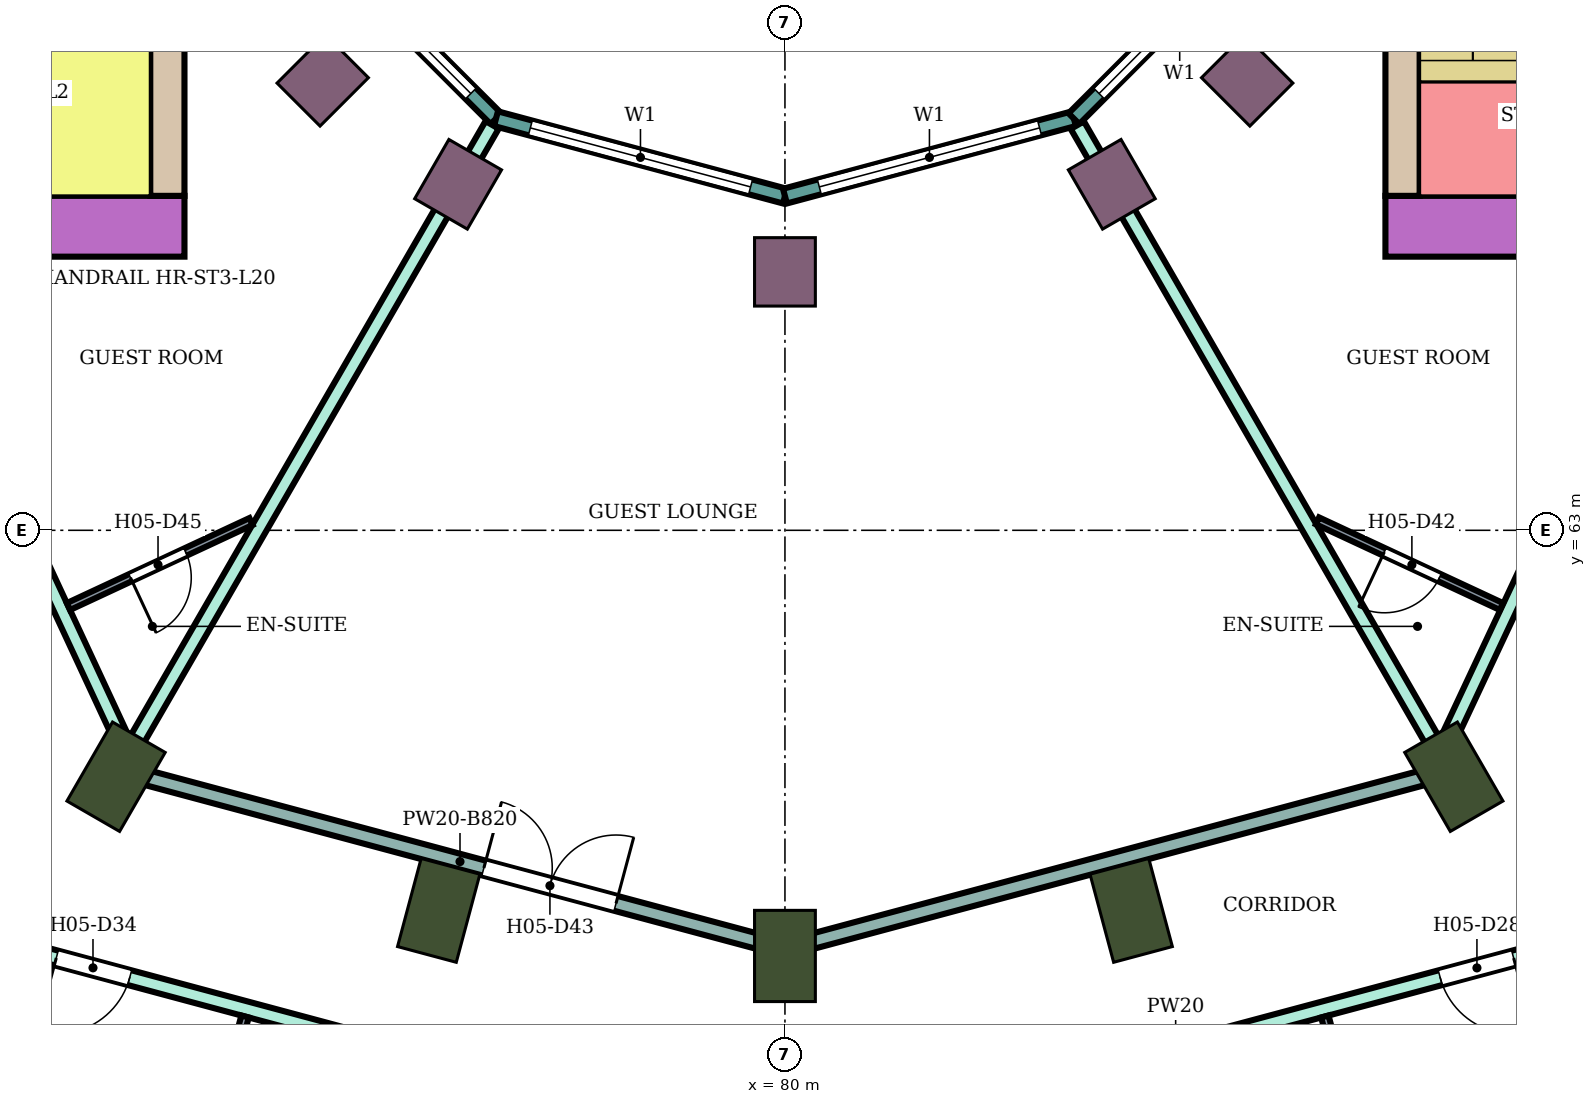
"""IFC4 building model, lengths in metres.
Left out: names, types, materials, properties, quantities, classifications, styles, units other than length and angle.
Written with IfcOpenShell. Run it as: python <this file> out.ifc"""

import sys

from ifc_helpers import new_model, si_unit, direction, frame, frame_2d, origin, origin_2d, place, context, subcontext, project, spatial, rectangle, extrude, element, fill, save


model = new_model("IFC4")
c1 = context("Model", 3, precision=1e-05, world=origin(), true_north=direction((0.0, 1.0)))
c2 = subcontext(c1, "Body", "Model", "MODEL_VIEW")
j1 = project(units=[si_unit("LENGTHUNIT", "METRE"), si_unit("PLANEANGLEUNIT", "RADIAN")], contexts=[c1])
p1 = place(None, origin())
s1 = spatial("IfcSite", under=j1, at=p1, CompositionType="ELEMENT")
p2 = place(p1, origin())
s2 = spatial("IfcBuilding", under=s1, at=p2, CompositionType="ELEMENT")
p3 = place(p2, frame((0.0, 0.0, 90.0)))
s3 = spatial("IfcBuildingStorey", under=s2, at=p3, CompositionType="ELEMENT", Elevation=90.0)
for number, where, z_axis, x_axis in (
    (1, (71.2, 59.758, 0.0), (0.0, 0.0, 1.0), (-0.5, -0.866, 0.0)),
    (2, (75.445, 58.0, 0.0), (0.0, 0.0, 1.0), (-0.259, -0.966, 0.0)),
    (3, (80.0, 57.4, 0.0), (0.0, 0.0, 1.0), (0.0, -1.0, 0.0)),
    (4, (84.555, 58.0, 0.0), (0.0, 0.0, 1.0), (0.259, -0.966, 0.0)),
    (5, (88.8, 59.758, 0.0), (0.0, 0.0, 1.0), (0.5, -0.866, 0.0)),
):
    element("IfcColumn", number, at=place(p3, frame(where, z_axis=z_axis, x_axis=x_axis)), inside=s3, PredefinedType="COLUMN", context=c2, shape_type="SweptSolid", body=[
        extrude(rectangle(XDim=1.2, YDim=0.8, at=origin_2d()), origin(), (0.0, 0.0, 1.0), 3.8),
    ])
for number, where, z_axis, x_axis in (
    (6, (73.919, 68.919, 0.0), (0.0, 0.0, 1.0), (-0.707, -0.707, 0.0)),
    (7, (75.7, 67.552, 0.0), (0.0, 0.0, 1.0), (-0.5, -0.866, 0.0)),
    (8, (80.0, 66.4, 0.0), (0.0, 0.0, 1.0), (0.0, -1.0, 0.0)),
    (9, (84.3, 67.552, 0.0), (0.0, 0.0, 1.0), (0.5, -0.866, 0.0)),
    (10, (86.081, 68.919, 0.0), (0.0, 0.0, 1.0), (0.707, -0.707, 0.0)),
):
    element("IfcColumn", number, at=place(p3, frame(where, z_axis=z_axis, x_axis=x_axis)), inside=s3, PredefinedType="COLUMN", context=c2, shape_type="SweptSolid", body=[
        extrude(rectangle(XDim=0.9, YDim=0.8, at=origin_2d()), origin(), (0.0, 0.0, 1.0), 3.8),
    ])
p4 = place(p3, frame((87.9, 67.0, 0.0), z_axis=(0.0, 0.0, 1.0), x_axis=(1.0, 0.0, 0.0)))
e11 = element("IfcWall", 11, at=p4, inside=s3, PredefinedType="SHEAR", context=c2, shape_type="SweptSolid", body=[
    extrude(rectangle(XDim=14.7, YDim=0.8, at=frame_2d((7.35, 0.0))), origin(), (0.0, 0.0, 1.0), 3.48),
])
p5 = place(p4, frame((4.2, 0.0, 0.0)))
e12 = element("IfcOpeningElement", 12, at=p5, cuts=e11, PredefinedType="OPENING", context=c2, shape_type="SweptSolid", body=[
    extrude(rectangle(XDim=2.4, YDim=2.4, at=frame_2d((1.2, 1.2))), frame((0.0, 0.41, 0.0), z_axis=(0.0, -1.0, 0.0), x_axis=(1.0, 0.0, 0.0)), (0.0, 0.0, 1.0), 0.82),
])
p6 = place(p3, frame((88.125, 67.4, 0.0), z_axis=(0.0, 0.0, 1.0), x_axis=(0.0, 1.0, 0.0)))
e13 = element("IfcWall", 13, at=p6, inside=s3, PredefinedType="SHEAR", context=c2, shape_type="SweptSolid", body=[
    extrude(rectangle(XDim=7.6, YDim=0.45, at=frame_2d((3.8, 0.0))), origin(), (0.0, 0.0, 1.0), 3.48),
])
p7 = place(p3, frame((72.1, 67.0, 0.0), z_axis=(0.0, 0.0, 1.0), x_axis=(-1.0, 0.0, 0.0)))
e14 = element("IfcWall", 14, at=p7, inside=s3, PredefinedType="SHEAR", context=c2, shape_type="SweptSolid", body=[
    extrude(rectangle(XDim=14.7, YDim=0.8, at=frame_2d((7.35, 0.0))), origin(), (0.0, 0.0, 1.0), 3.48),
])
p8 = place(p7, frame((4.2, 0.0, 0.0)))
e15 = element("IfcOpeningElement", 15, at=p8, cuts=e14, PredefinedType="OPENING", context=c2, shape_type="SweptSolid", body=[
    extrude(rectangle(XDim=2.4, YDim=2.4, at=frame_2d((1.2, 1.2))), frame((0.0, 0.41, 0.0), z_axis=(0.0, -1.0, 0.0), x_axis=(1.0, 0.0, 0.0)), (0.0, 0.0, 1.0), 0.82),
])
p9 = place(p3, frame((71.875, 75.0, 0.0), z_axis=(0.0, 0.0, 1.0), x_axis=(0.0, -1.0, 0.0)))
e16 = element("IfcWall", 16, at=p9, inside=s3, PredefinedType="SHEAR", context=c2, shape_type="SweptSolid", body=[
    extrude(rectangle(XDim=7.6, YDim=0.45, at=frame_2d((3.8, 0.0))), origin(), (0.0, 0.0, 1.0), 3.48),
])
p10 = place(p3, frame((73.415, 71.198, 0.0), z_axis=(0.0, 0.0, 1.0), x_axis=(0.707106781187, -0.707106781187, 0.0)))
e17 = element("IfcWall", 17, at=p10, inside=s3, PredefinedType="NOTDEFINED", context=c2, shape_type="SweptSolid", body=[
    extrude(rectangle(XDim=3.936, YDim=0.2, at=frame_2d((1.968, 0.0))), origin(), (0.0, 0.0, 1.0), 3.8),
])
p11 = place(p10, frame((0.468, 0.0, 0.9)))
e18 = element("IfcOpeningElement", 18, at=p11, cuts=e17, PredefinedType="OPENING", context=c2, shape_type="SweptSolid", body=[
    extrude(rectangle(XDim=3.0, YDim=2.3, at=frame_2d((1.5, 1.15))), frame((0.0, 0.11, 0.0), z_axis=(0.0, -1.0, 0.0), x_axis=(1.0, 0.0, 0.0)), (0.0, 0.0, 1.0), 0.22),
])
p12 = place(p3, frame((76.198, 68.415, 0.0), z_axis=(0.0, 0.0, 1.0), x_axis=(0.965933654434, -0.258789828301, 0.0)))
e19 = element("IfcWall", 19, at=p12, inside=s3, PredefinedType="NOTDEFINED", context=c2, shape_type="SweptSolid", body=[
    extrude(rectangle(XDim=3.936, YDim=0.2, at=frame_2d((1.968, 0.0))), origin(), (0.0, 0.0, 1.0), 3.8),
])
p13 = place(p12, frame((0.468, 0.0, 0.9)))
e20 = element("IfcOpeningElement", 20, at=p13, cuts=e19, PredefinedType="OPENING", context=c2, shape_type="SweptSolid", body=[
    extrude(rectangle(XDim=3.0, YDim=2.3, at=frame_2d((1.5, 1.15))), frame((0.0, 0.11, 0.0), z_axis=(0.0, -1.0, 0.0), x_axis=(1.0, 0.0, 0.0)), (0.0, 0.0, 1.0), 0.22),
])
p14 = place(p3, frame((80.0, 67.396, 0.0), z_axis=(0.0, 0.0, 1.0), x_axis=(0.965933654434, 0.258789828301, 0.0)))
e21 = element("IfcWall", 21, at=p14, inside=s3, PredefinedType="NOTDEFINED", context=c2, shape_type="SweptSolid", body=[
    extrude(rectangle(XDim=3.936, YDim=0.2, at=frame_2d((1.968, 0.0))), origin(), (0.0, 0.0, 1.0), 3.8),
])
p15 = place(p14, frame((0.468, 0.0, 0.9)))
e22 = element("IfcOpeningElement", 22, at=p15, cuts=e21, PredefinedType="OPENING", context=c2, shape_type="SweptSolid", body=[
    extrude(rectangle(XDim=3.0, YDim=2.3, at=frame_2d((1.5, 1.15))), frame((0.0, 0.11, 0.0), z_axis=(0.0, -1.0, 0.0), x_axis=(1.0, 0.0, 0.0)), (0.0, 0.0, 1.0), 0.22),
])
p16 = place(p3, frame((83.802, 68.415, 0.0), z_axis=(0.0, 0.0, 1.0), x_axis=(0.707106781187, 0.707106781187, 0.0)))
e23 = element("IfcWall", 23, at=p16, inside=s3, PredefinedType="NOTDEFINED", context=c2, shape_type="SweptSolid", body=[
    extrude(rectangle(XDim=3.936, YDim=0.2, at=frame_2d((1.968, 0.0))), origin(), (0.0, 0.0, 1.0), 3.8),
])
p17 = place(p16, frame((0.468, 0.0, 0.9)))
e24 = element("IfcOpeningElement", 24, at=p17, cuts=e23, PredefinedType="OPENING", context=c2, shape_type="SweptSolid", body=[
    extrude(rectangle(XDim=3.0, YDim=2.3, at=frame_2d((1.5, 1.15))), frame((0.0, 0.11, 0.0), z_axis=(0.0, -1.0, 0.0), x_axis=(1.0, 0.0, 0.0)), (0.0, 0.0, 1.0), 0.22),
])
p18 = place(p3, frame((68.321, 66.6, 0.0), z_axis=(0.0, 0.0, 1.0), x_axis=(0.421914092414, -0.906635813666, 0.0)))
e25 = element("IfcWall", 25, at=p18, inside=s3, PredefinedType="PARTITIONING", context=c2, shape_type="SweptSolid", body=[
    extrude(rectangle(XDim=7.459, YDim=0.2, at=frame_2d((3.73, 0.0))), origin(), (0.0, 0.0, 1.0), 3.35),
])
p19 = place(p18, frame((0.7, 0.0, 0.0)))
e26 = element("IfcOpeningElement", 26, at=p19, cuts=e25, PredefinedType="OPENING", context=c2, shape_type="SweptSolid", body=[
    extrude(rectangle(XDim=1.0, YDim=2.1, at=frame_2d((0.5, 1.05))), frame((0.0, 0.11, 0.0), z_axis=(0.0, -1.0, 0.0), x_axis=(1.0, 0.0, 0.0)), (0.0, 0.0, 1.0), 0.22),
])
p20 = place(p3, frame((69.652, 57.578, 0.0), z_axis=(0.0, 0.0, 1.0), x_axis=(0.965857425723, -0.259074184695, 0.0)))
e27 = element("IfcWall", 27, at=p20, inside=s3, PredefinedType="PARTITIONING", context=c2, shape_type="SweptSolid", body=[
    extrude(rectangle(XDim=10.623, YDim=0.2, at=frame_2d((5.312, 0.0))), origin(), (0.0, 0.0, 1.0), 3.35),
])
p21 = place(p20, frame((9.163, 0.0, 0.0)))
e28 = element("IfcOpeningElement", 28, at=p21, cuts=e27, PredefinedType="OPENING", context=c2, shape_type="SweptSolid", body=[
    extrude(rectangle(XDim=1.0, YDim=2.1, at=frame_2d((0.5, 1.05))), frame((0.0, 0.11, 0.0), z_axis=(0.0, -1.0, 0.0), x_axis=(1.0, 0.0, 0.0)), (0.0, 0.0, 1.0), 0.22),
])
p22 = place(p20, frame((0.788, 0.0, 0.0)))
e29 = element("IfcOpeningElement", 29, at=p22, cuts=e27, PredefinedType="OPENING", context=c2, shape_type="SweptSolid", body=[
    extrude(rectangle(XDim=1.0, YDim=2.1, at=frame_2d((0.5, 1.05))), frame((0.0, 0.11, 0.0), z_axis=(0.0, -1.0, 0.0), x_axis=(1.0, 0.0, 0.0)), (0.0, 0.0, 1.0), 0.22),
])
p23 = place(p3, frame((71.459, 60.218, 0.0), z_axis=(0.0, 0.0, 1.0), x_axis=(0.500232027118, 0.865891401416, 0.0)))
e30 = element("IfcWall", 30, at=p23, inside=s3, PredefinedType="PARTITIONING", context=c2, shape_type="SweptSolid", body=[
    extrude(rectangle(XDim=9.372, YDim=0.2, at=frame_2d((4.686, 0.0))), origin(), (0.0, 0.0, 1.0), 3.35),
])
p24 = place(p3, frame((71.498, 59.774, 0.0), z_axis=(0.0, 0.0, 1.0), x_axis=(0.965911938046, -0.258870871168, 0.0)))
e31 = element("IfcWall", 31, at=p24, inside=s3, PredefinedType="PARTITIONING", context=c2, shape_type="SweptSolid", body=[
    extrude(rectangle(XDim=8.752, YDim=0.2, at=frame_2d((4.376, 0.0))), origin(), (0.0, 0.0, 1.0), 2.98),
])
p25 = place(p24, frame((4.701, 0.0, 0.0)))
e32 = element("IfcOpeningElement", 32, at=p25, cuts=e31, PredefinedType="OPENING", context=c2, shape_type="SweptSolid", body=[
    extrude(rectangle(XDim=1.8, YDim=2.1, at=frame_2d((0.9, 1.05))), frame((0.0, 0.11, 0.0), z_axis=(0.0, -1.0, 0.0), x_axis=(1.0, 0.0, 0.0)), (0.0, 0.0, 1.0), 0.22),
])
p26 = place(p3, frame((80.0, 54.805, 0.0), z_axis=(0.0, 0.0, 1.0), x_axis=(0.965962177934, 0.258683340788, 0.0)))
e33 = element("IfcWall", 33, at=p26, inside=s3, PredefinedType="PARTITIONING", context=c2, shape_type="SweptSolid", body=[
    extrude(rectangle(XDim=10.643, YDim=0.2, at=frame_2d((5.322, 0.0))), origin(), (0.0, 0.0, 1.0), 3.35),
])
p27 = place(p26, frame((8.925, 0.0, 0.0)))
e34 = element("IfcOpeningElement", 34, at=p27, cuts=e33, PredefinedType="OPENING", context=c2, shape_type="SweptSolid", body=[
    extrude(rectangle(XDim=1.0, YDim=2.1, at=frame_2d((0.5, 1.05))), frame((0.0, 0.11, 0.0), z_axis=(0.0, -1.0, 0.0), x_axis=(1.0, 0.0, 0.0)), (0.0, 0.0, 1.0), 0.22),
])
p28 = place(p26, frame((0.55, 0.0, 0.0)))
e35 = element("IfcOpeningElement", 35, at=p28, cuts=e33, PredefinedType="OPENING", context=c2, shape_type="SweptSolid", body=[
    extrude(rectangle(XDim=1.0, YDim=2.1, at=frame_2d((0.5, 1.05))), frame((0.0, 0.11, 0.0), z_axis=(0.0, -1.0, 0.0), x_axis=(1.0, 0.0, 0.0)), (0.0, 0.0, 1.0), 0.22),
])
p29 = place(p3, frame((80.0, 57.496, 0.0), z_axis=(0.0, 0.0, 1.0), x_axis=(0.96592471314, 0.258823199396, 0.0)))
e36 = element("IfcWall", 36, at=p29, inside=s3, PredefinedType="PARTITIONING", context=c2, shape_type="SweptSolid", body=[
    extrude(rectangle(XDim=8.732, YDim=0.2, at=frame_2d((4.366, 0.0))), origin(), (0.0, 0.0, 1.0), 2.98),
])
p30 = place(p3, frame((83.846, 68.33, 0.0), z_axis=(0.0, 0.0, 1.0), x_axis=(0.499822319857, -0.866127963163, 0.0)))
e37 = element("IfcWall", 37, at=p30, inside=s3, PredefinedType="PARTITIONING", context=c2, shape_type="SweptSolid", body=[
    extrude(rectangle(XDim=9.382, YDim=0.2, at=frame_2d((4.691, 0.0))), origin(), (0.0, 0.0, 1.0), 3.35),
])
p31 = place(p3, frame((88.501, 59.775, 0.0), z_axis=(0.0, 0.0, 1.0), x_axis=(0.424700525505, 0.905333896215, 0.0)))
e38 = element("IfcWall", 38, at=p31, inside=s3, PredefinedType="PARTITIONING", context=c2, shape_type="SweptSolid", body=[
    extrude(rectangle(XDim=7.53, YDim=0.2, at=frame_2d((3.765, 0.0))), origin(), (0.0, 0.0, 1.0), 3.35),
])
p32 = place(p31, frame((5.83, 0.0, 0.0)))
e39 = element("IfcOpeningElement", 39, at=p32, cuts=e38, PredefinedType="OPENING", context=c2, shape_type="SweptSolid", body=[
    extrude(rectangle(XDim=1.0, YDim=2.1, at=frame_2d((0.5, 1.05))), frame((0.0, 0.11, 0.0), z_axis=(0.0, -1.0, 0.0), x_axis=(1.0, 0.0, 0.0)), (0.0, 0.0, 1.0), 0.22),
])
p33 = place(p3, frame((70.574, 61.997, 0.0), z_axis=(0.0, 0.0, 1.0), x_axis=(0.906503026865, 0.422199315826, 0.0)))
e40 = element("IfcWall", 40, at=p33, inside=s3, PredefinedType="PARTITIONING", context=c2, shape_type="SweptSolid", body=[
    extrude(rectangle(XDim=2.65, YDim=0.1, at=frame_2d((1.325, 0.0))), origin(), (0.0, 0.0, 1.0), 3.35),
])
p34 = place(p33, frame((0.9, 0.0, 0.0)))
e41 = element("IfcOpeningElement", 41, at=p34, cuts=e40, PredefinedType="OPENING", context=c2, shape_type="SweptSolid", body=[
    extrude(rectangle(XDim=0.8, YDim=2.1, at=frame_2d((0.4, 1.05))), frame((0.0, 0.06, 0.0), z_axis=(0.0, -1.0, 0.0), x_axis=(1.0, 0.0, 0.0)), (0.0, 0.0, 1.0), 0.12),
])
p35 = place(p3, frame((72.211, 54.044, 0.0), z_axis=(0.0, 0.0, 1.0), x_axis=(0.258866552082, 0.96591309558, 0.0)))
e42 = element("IfcWall", 42, at=p35, inside=s3, PredefinedType="PARTITIONING", context=c2, shape_type="SweptSolid", body=[
    extrude(rectangle(XDim=2.65, YDim=0.1, at=frame_2d((1.325, 0.0))), origin(), (0.0, 0.0, 1.0), 3.35),
])
p36 = place(p35, frame((0.95, 0.0, 0.0)))
e43 = element("IfcOpeningElement", 43, at=p36, cuts=e42, PredefinedType="OPENING", context=c2, shape_type="SweptSolid", body=[
    extrude(rectangle(XDim=0.8, YDim=2.1, at=frame_2d((0.4, 1.05))), frame((0.0, 0.06, 0.0), z_axis=(0.0, -1.0, 0.0), x_axis=(1.0, 0.0, 0.0)), (0.0, 0.0, 1.0), 0.12),
])
p37 = place(p3, frame((87.006, 63.124, 0.0), z_axis=(0.0, 0.0, 1.0), x_axis=(0.906535604863, -0.422129360642, 0.0)))
e44 = element("IfcWall", 44, at=p37, inside=s3, PredefinedType="PARTITIONING", context=c2, shape_type="SweptSolid", body=[
    extrude(rectangle(XDim=2.67, YDim=0.1, at=frame_2d((1.335, 0.0))), origin(), (0.0, 0.0, 1.0), 3.35),
])
p38 = place(p37, frame((0.97, 0.0, 0.0)))
e45 = element("IfcOpeningElement", 45, at=p38, cuts=e44, PredefinedType="OPENING", context=c2, shape_type="SweptSolid", body=[
    extrude(rectangle(XDim=0.8, YDim=2.1, at=frame_2d((0.4, 1.05))), frame((0.0, 0.06, 0.0), z_axis=(0.0, -1.0, 0.0), x_axis=(1.0, 0.0, 0.0)), (0.0, 0.0, 1.0), 0.12),
])
p39 = place(p3, frame((87.103, 56.604, 0.0), z_axis=(0.0, 0.0, 1.0), x_axis=(0.258883730688, -0.965908491517, 0.0)))
e46 = element("IfcWall", 46, at=p39, inside=s3, PredefinedType="PARTITIONING", context=c2, shape_type="SweptSolid", body=[
    extrude(rectangle(XDim=2.7, YDim=0.1, at=frame_2d((1.35, 0.0))), origin(), (0.0, 0.0, 1.0), 3.35),
])
p40 = place(p39, frame((0.9, 0.0, 0.0)))
e47 = element("IfcOpeningElement", 47, at=p40, cuts=e46, PredefinedType="OPENING", context=c2, shape_type="SweptSolid", body=[
    extrude(rectangle(XDim=0.8, YDim=2.1, at=frame_2d((0.4, 1.05))), frame((0.0, 0.06, 0.0), z_axis=(0.0, -1.0, 0.0), x_axis=(1.0, 0.0, 0.0)), (0.0, 0.0, 1.0), 0.12),
])
p41 = place(p11, origin())
e48 = element("IfcWindow", 48, at=p41, inside=s3, PartitioningType="SINGLE_PANEL", PredefinedType="WINDOW", context=c2, shape_type="SweptSolid", body=[
    extrude(rectangle(XDim=3.0, YDim=2.3, at=frame_2d((1.5, 1.15))), frame((0.0, 0.03, 0.0), z_axis=(0.0, -1.0, 0.0), x_axis=(1.0, 0.0, 0.0)), (0.0, 0.0, 1.0), 0.06),
])
fill(e18, e48)
p42 = place(p13, origin())
e49 = element("IfcWindow", 49, at=p42, inside=s3, PartitioningType="SINGLE_PANEL", PredefinedType="WINDOW", context=c2, shape_type="SweptSolid", body=[
    extrude(rectangle(XDim=3.0, YDim=2.3, at=frame_2d((1.5, 1.15))), frame((0.0, 0.03, 0.0), z_axis=(0.0, -1.0, 0.0), x_axis=(1.0, 0.0, 0.0)), (0.0, 0.0, 1.0), 0.06),
])
fill(e20, e49)
p43 = place(p15, origin())
e50 = element("IfcWindow", 50, at=p43, inside=s3, PartitioningType="SINGLE_PANEL", PredefinedType="WINDOW", context=c2, shape_type="SweptSolid", body=[
    extrude(rectangle(XDim=3.0, YDim=2.3, at=frame_2d((1.5, 1.15))), frame((0.0, 0.03, 0.0), z_axis=(0.0, -1.0, 0.0), x_axis=(1.0, 0.0, 0.0)), (0.0, 0.0, 1.0), 0.06),
])
fill(e22, e50)
p44 = place(p17, origin())
e51 = element("IfcWindow", 51, at=p44, inside=s3, PartitioningType="SINGLE_PANEL", PredefinedType="WINDOW", context=c2, shape_type="SweptSolid", body=[
    extrude(rectangle(XDim=3.0, YDim=2.3, at=frame_2d((1.5, 1.15))), frame((0.0, 0.03, 0.0), z_axis=(0.0, -1.0, 0.0), x_axis=(1.0, 0.0, 0.0)), (0.0, 0.0, 1.0), 0.06),
])
fill(e24, e51)
p45 = place(p27, frame((1.0, 0.0, 0.0), z_axis=(0.0, 0.0, 1.0), x_axis=(-1.0, 0.0, 0.0)))
e52 = element("IfcDoor", 52, at=p45, inside=s3, OperationType="SINGLE_SWING_LEFT", PredefinedType="DOOR", context=c2, shape_type="SweptSolid", body=[
    extrude(rectangle(XDim=1.0, YDim=2.1, at=frame_2d((0.5, 1.05))), frame((0.0, 0.025, 0.0), z_axis=(0.0, -1.0, 0.0), x_axis=(1.0, 0.0, 0.0)), (0.0, 0.0, 1.0), 0.05),
])
fill(e34, e52)
p46 = place(p22, frame((1.0, 0.0, 0.0), z_axis=(0.0, 0.0, 1.0), x_axis=(-1.0, 0.0, 0.0)))
e53 = element("IfcDoor", 53, at=p46, inside=s3, OperationType="SINGLE_SWING_RIGHT", PredefinedType="DOOR", context=c2, shape_type="SweptSolid", body=[
    extrude(rectangle(XDim=1.0, YDim=2.1, at=frame_2d((0.5, 1.05))), frame((0.0, 0.025, 0.0), z_axis=(0.0, -1.0, 0.0), x_axis=(1.0, 0.0, 0.0)), (0.0, 0.0, 1.0), 0.05),
])
fill(e29, e53)
p47 = place(p38, frame((0.8, 0.0, 0.0), z_axis=(0.0, 0.0, 1.0), x_axis=(-1.0, 0.0, 0.0)))
e54 = element("IfcDoor", 54, at=p47, inside=s3, OperationType="SINGLE_SWING_RIGHT", PredefinedType="DOOR", context=c2, shape_type="SweptSolid", body=[
    extrude(rectangle(XDim=0.8, YDim=2.1, at=frame_2d((0.4, 1.05))), frame((0.0, 0.025, 0.0), z_axis=(0.0, -1.0, 0.0), x_axis=(1.0, 0.0, 0.0)), (0.0, 0.0, 1.0), 0.05),
])
fill(e45, e54)
p48 = place(p25, origin())
e55 = element("IfcDoor", 55, at=p48, inside=s3, OperationType="DOUBLE_DOOR_SINGLE_SWING", PredefinedType="DOOR", context=c2, shape_type="SweptSolid", body=[
    extrude(rectangle(XDim=1.8, YDim=2.1, at=frame_2d((0.9, 1.05))), frame((0.0, 0.025, 0.0), z_axis=(0.0, -1.0, 0.0), x_axis=(1.0, 0.0, 0.0)), (0.0, 0.0, 1.0), 0.05),
])
fill(e32, e55)
p49 = place(p34, frame((0.8, 0.0, 0.0), z_axis=(0.0, 0.0, 1.0), x_axis=(-1.0, 0.0, 0.0)))
e56 = element("IfcDoor", 56, at=p49, inside=s3, OperationType="SINGLE_SWING_RIGHT", PredefinedType="DOOR", context=c2, shape_type="SweptSolid", body=[
    extrude(rectangle(XDim=0.8, YDim=2.1, at=frame_2d((0.4, 1.05))), frame((0.0, 0.025, 0.0), z_axis=(0.0, -1.0, 0.0), x_axis=(1.0, 0.0, 0.0)), (0.0, 0.0, 1.0), 0.05),
])
fill(e41, e56)
save(model, sys.argv[1])
